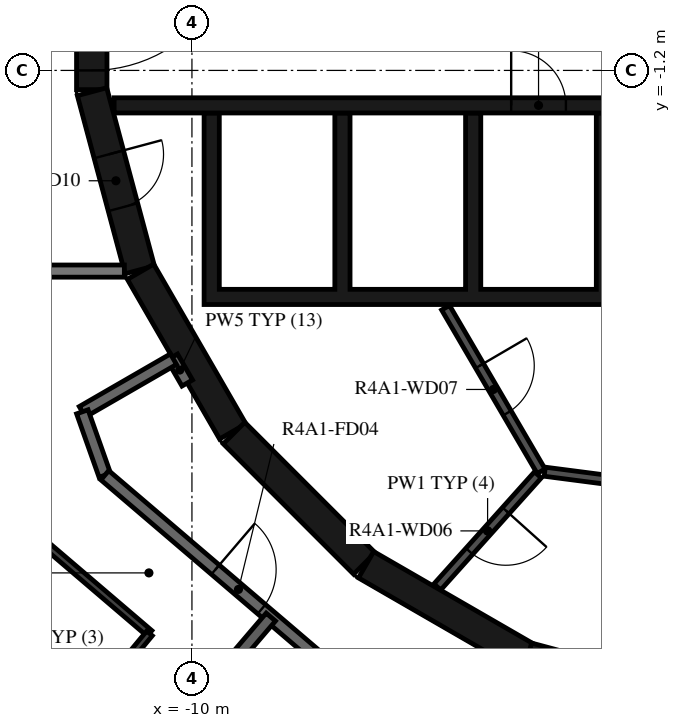
"""IFC4 building model, lengths in metres.
Left out: names, types, materials, properties, quantities, classifications, styles, units other than length and angle.
Written with IfcOpenShell. Run it as: python <this file> out.ifc"""

import sys

from ifc_helpers import new_model, si_unit, direction, frame, frame_2d, origin, place, context, subcontext, project, spatial, polyline, rectangle, outline, extrude, element, fill, save


model = new_model("IFC4")
c1 = context("Model", 3, precision=1e-05, world=origin(), true_north=direction((0.0, 1.0)))
c2 = subcontext(c1, "Body", "Model", "MODEL_VIEW")
j1 = project(units=[si_unit("LENGTHUNIT", "METRE"), si_unit("PLANEANGLEUNIT", "RADIAN")], contexts=[c1])
p1 = place(None, origin())
s1 = spatial("IfcSite", under=j1, at=p1, CompositionType="ELEMENT")
p2 = place(p1, origin())
s2 = spatial("IfcBuilding", under=s1, at=p2, CompositionType="ELEMENT")
p3 = place(p2, frame((0.0, 0.0, 155.2)))
s3 = spatial("IfcBuildingStorey", under=s2, at=p3, CompositionType="ELEMENT", Elevation=155.2)
p4 = place(p3, frame((-11.647, 1.516, 0.0), z_axis=(0.0, 0.0, 1.0), x_axis=(0.0, -1.0, 0.0)))
e1 = element("IfcWall", 1, at=p4, inside=s3, PredefinedType="SHEAR", context=c2, shape_type="SweptSolid", body=[
    extrude(rectangle(XDim=3.033, YDim=0.5, at=frame_2d((1.516, 0.0))), origin(), (0.0, 0.0, 1.0), 3.12),
])
p5 = place(p4, frame((0.316, 0.0, 0.0)))
e2 = element("IfcOpeningElement", 2, at=p5, cuts=e1, PredefinedType="OPENING", context=c2, shape_type="SweptSolid", body=[
    extrude(rectangle(XDim=2.4, YDim=2.1, at=frame_2d((1.2, 1.05))), frame((0.0, 0.26, 0.0), z_axis=(0.0, -1.0, 0.0), x_axis=(1.0, 0.0, 0.0)), (0.0, 0.0, 1.0), 0.52),
])
p6 = place(p3, frame((-11.643, -1.55, 0.0), z_axis=(0.0, 0.0, 1.0), x_axis=(0.258734743916, -0.965948410781, 0.0)))
e3 = element("IfcWall", 3, at=p6, inside=s3, PredefinedType="SHEAR", context=c2, shape_type="SweptSolid", body=[
    extrude(rectangle(XDim=3.033, YDim=0.5, at=frame_2d((1.516, 0.0))), origin(), (0.0, 0.0, 1.0), 3.12),
])
p7 = place(p6, frame((1.066, 0.0, 0.0)))
e4 = element("IfcOpeningElement", 4, at=p7, cuts=e3, PredefinedType="OPENING", context=c2, shape_type="SweptSolid", body=[
    extrude(rectangle(XDim=0.9, YDim=2.1, at=frame_2d((0.45, 1.05))), frame((0.0, 0.26, 0.0), z_axis=(0.0, -1.0, 0.0), x_axis=(1.0, 0.0, 0.0)), (0.0, 0.0, 1.0), 0.52),
])
p8 = place(p3, frame((-10.845, -4.51, 0.0), z_axis=(0.0, 0.0, 1.0), x_axis=(0.500087131594, -0.865975092491, 0.0)))
e5 = element("IfcWall", 5, at=p8, inside=s3, PredefinedType="SHEAR", context=c2, shape_type="SweptSolid", body=[
    extrude(rectangle(XDim=3.033, YDim=0.5, at=frame_2d((1.516, 0.0))), origin(), (0.0, 0.0, 1.0), 3.12),
])
p9 = place(p3, frame((-9.308, -7.164, 0.0), z_axis=(0.0, 0.0, 1.0), x_axis=(0.707106781187, -0.707106781187, 0.0)))
e6 = element("IfcWall", 6, at=p9, inside=s3, PredefinedType="SHEAR", context=c2, shape_type="SweptSolid", body=[
    extrude(rectangle(XDim=3.032, YDim=0.5, at=frame_2d((1.516, 0.0))), origin(), (0.0, 0.0, 1.0), 3.12),
])
for number, where, z_axis, x_axis in (
    (7, (-7.137, -9.329, 0.0), (0.0, 0.0, 1.0), (0.866, -0.5, 0.0)),
    (8, (-4.479, -10.858, 0.0), (0.0, 0.0, 1.0), (0.966, -0.259, 0.0)),
):
    element("IfcWall", number, at=place(p3, frame(where, z_axis=z_axis, x_axis=x_axis)), inside=s3, PredefinedType="SHEAR", context=c2, shape_type="SweptSolid", body=[
        extrude(rectangle(XDim=3.033, YDim=0.5, at=frame_2d((1.516, 0.0))), origin(), (0.0, 0.0, 1.0), 3.12),
    ])
p10 = place(p3, origin())
e9 = element("IfcWall", 9, at=p10, inside=s3, PredefinedType="SHEAR", context=c2, shape_type="SweptSolid", body=[
    extrude(outline(polyline([(9.8, -5.05), (9.8, -4.8), (9.8, -1.9), (9.55, -1.9), (9.55, -4.8), (7.65, -4.8), (7.65, -1.9), (7.4, -1.9), (7.4, -4.8), (5.5, -4.8), (5.5, -1.9), (5.25, -1.9), (5.25, -4.8), (3.35, -4.8), (3.35, -1.9), (3.1, -1.9), (3.1, -4.8), (1.2, -4.8), (1.2, -1.9), (0.95, -1.9), (0.95, -4.8), (-0.95, -4.8), (-0.95, -1.9), (-1.2, -1.9), (-1.2, -4.8), (-3.1, -4.8), (-3.1, -1.9), (-3.35, -1.9), (-3.35, -4.8), (-5.25, -4.8), (-5.25, -1.9), (-5.5, -1.9), (-5.5, -4.8), (-7.4, -4.8), (-7.4, -1.9), (-7.65, -1.9), (-7.65, -4.8), (-9.55, -4.8), (-9.55, -1.9), (-9.8, -1.9), (-9.8, -4.8), (-9.8, -5.05), (9.8, -5.05)])), origin(), (0.0, 0.0, 1.0), 3.12),
])
p11 = place(p3, frame((-11.28, -1.775, 0.0), z_axis=(0.0, 0.0, 1.0), x_axis=(1.0, 0.0, 0.0)))
e10 = element("IfcWall", 10, at=p11, inside=s3, PredefinedType="SHEAR", context=c2, shape_type="SweptSolid", body=[
    extrude(rectangle(XDim=14.38, YDim=0.25, at=frame_2d((7.19, 0.0))), origin(), (0.0, 0.0, 1.0), 3.12),
])
p12 = place(p11, frame((12.88, 0.0, 0.0)))
e11 = element("IfcOpeningElement", 11, at=p12, cuts=e10, PredefinedType="OPENING", context=c2, shape_type="SweptSolid", body=[
    extrude(rectangle(XDim=1.1, YDim=2.1, at=frame_2d((0.55, 1.05))), frame((0.0, 0.135, 0.0), z_axis=(0.0, -1.0, 0.0), x_axis=(1.0, 0.0, 0.0)), (0.0, 0.0, 1.0), 0.27),
])
p13 = place(p11, frame((6.53, 0.0, 0.0)))
e12 = element("IfcOpeningElement", 12, at=p13, cuts=e10, PredefinedType="OPENING", context=c2, shape_type="SweptSolid", body=[
    extrude(rectangle(XDim=0.9, YDim=2.1, at=frame_2d((0.45, 1.05))), frame((0.0, 0.135, 0.0), z_axis=(0.0, -1.0, 0.0), x_axis=(1.0, 0.0, 0.0)), (0.0, 0.0, 1.0), 0.27),
])
p14 = place(p11, frame((8.68, 0.0, 0.0)))
e13 = element("IfcOpeningElement", 13, at=p14, cuts=e10, PredefinedType="OPENING", context=c2, shape_type="SweptSolid", body=[
    extrude(rectangle(XDim=0.9, YDim=2.1, at=frame_2d((0.45, 1.05))), frame((0.0, 0.135, 0.0), z_axis=(0.0, -1.0, 0.0), x_axis=(1.0, 0.0, 0.0)), (0.0, 0.0, 1.0), 0.27),
])
p15 = place(p11, frame((10.83, 0.0, 0.0)))
e14 = element("IfcOpeningElement", 14, at=p15, cuts=e10, PredefinedType="OPENING", context=c2, shape_type="SweptSolid", body=[
    extrude(rectangle(XDim=0.9, YDim=2.1, at=frame_2d((0.45, 1.05))), frame((0.0, 0.135, 0.0), z_axis=(0.0, -1.0, 0.0), x_axis=(1.0, 0.0, 0.0)), (0.0, 0.0, 1.0), 0.27),
])
p16 = place(p3, frame((-5.829, -5.102, 0.0), z_axis=(0.0, 0.0, 1.0), x_axis=(0.504480008384, -0.863423373057, 0.0)))
e15 = element("IfcWall", 15, at=p16, inside=s3, PredefinedType="PARTITIONING", context=c2, shape_type="SweptSolid", body=[
    extrude(rectangle(XDim=3.115, YDim=0.15, at=frame_2d((1.558, 0.0))), origin(), (0.0, 0.0, 1.0), 3.12),
])
p17 = place(p16, frame((1.107, 0.0, 0.0)))
e16 = element("IfcOpeningElement", 16, at=p17, cuts=e15, PredefinedType="OPENING", context=c2, shape_type="SweptSolid", body=[
    extrude(rectangle(XDim=0.9, YDim=2.1, at=frame_2d((0.45, 1.05))), frame((0.0, 0.085, 0.0), z_axis=(0.0, -1.0, 0.0), x_axis=(1.0, 0.0, 0.0)), (0.0, 0.0, 1.0), 0.17),
])
p18 = place(p3, frame((-4.311, -7.851, 0.0), z_axis=(0.0, 0.0, 1.0), x_axis=(-0.667869133096, -0.744278725383, 0.0)))
e17 = element("IfcWall", 17, at=p18, inside=s3, PredefinedType="PARTITIONING", context=c2, shape_type="SweptSolid", body=[
    extrude(rectangle(XDim=2.476, YDim=0.15, at=frame_2d((1.238, 0.0))), origin(), (0.0, 0.0, 1.0), 3.12),
])
p19 = place(p18, frame((0.788, 0.0, 0.0)))
e18 = element("IfcOpeningElement", 18, at=p19, cuts=e17, PredefinedType="OPENING", context=c2, shape_type="SweptSolid", body=[
    extrude(rectangle(XDim=0.9, YDim=2.1, at=frame_2d((0.45, 1.05))), frame((0.0, 0.085, 0.0), z_axis=(0.0, -1.0, 0.0), x_axis=(1.0, 0.0, 0.0)), (0.0, 0.0, 1.0), 0.17),
])
p20 = place(p3, frame((-4.198, -7.799, 0.0), z_axis=(0.0, 0.0, 1.0), x_axis=(0.991686747293, -0.128675542523, 0.0)))
e19 = element("IfcWall", 19, at=p20, inside=s3, PredefinedType="PARTITIONING", context=c2, shape_type="SweptSolid", body=[
    extrude(rectangle(XDim=1.793, YDim=0.15, at=frame_2d((0.896, 0.0))), origin(), (0.0, 0.0, 1.0), 3.12),
])
p21 = place(p3, frame((-10.323, -5.914, 0.0), z_axis=(0.0, 0.0, 1.0), x_axis=(0.500137201729, -0.865946175837, 0.0)))
e20 = element("IfcWall", 20, at=p21, inside=s3, PredefinedType="STANDARD", context=c2, shape_type="SweptSolid", body=[
    extrude(rectangle(XDim=0.492, YDim=0.2, at=frame_2d((0.246, 0.0))), origin(), (0.0, 0.0, 1.0), 3.12),
])
p22 = place(p3, frame((-10.303, -5.949, 0.0), z_axis=(0.0, 0.0, 1.0), x_axis=(-0.866021168401, -0.500007335828, 0.0)))
e21 = element("IfcWall", 21, at=p22, inside=s3, PredefinedType="STANDARD", context=c2, shape_type="SweptSolid", body=[
    extrude(rectangle(XDim=1.731, YDim=0.2, at=frame_2d((0.865, 0.0))), origin(), (0.0, 0.0, 1.0), 3.12),
])
p23 = place(p3, frame((-11.802, -6.814, 0.0), z_axis=(0.0, 0.0, 1.0), x_axis=(0.333904297771, -0.942606980629, 0.0)))
e22 = element("IfcWall", 22, at=p23, inside=s3, PredefinedType="STANDARD", context=c2, shape_type="SweptSolid", body=[
    extrude(rectangle(XDim=1.107, YDim=0.2, at=frame_2d((0.553, 0.0))), origin(), (0.0, 0.0, 1.0), 3.12),
])
p24 = place(p3, frame((-11.433, -7.858, 0.0), z_axis=(0.0, 0.0, 1.0), x_axis=(0.760412154545, -0.649440801937, 0.0)))
e23 = element("IfcWall", 23, at=p24, inside=s3, PredefinedType="STANDARD", context=c2, shape_type="SweptSolid", body=[
    extrude(rectangle(XDim=7.181, YDim=0.2, at=frame_2d((3.59, 0.0))), origin(), (0.0, 0.0, 1.0), 3.12),
])
p25 = place(p24, frame((2.39, 0.0, 0.0)))
e24 = element("IfcOpeningElement", 24, at=p25, cuts=e23, PredefinedType="OPENING", context=c2, shape_type="SweptSolid", body=[
    extrude(rectangle(XDim=1.0, YDim=2.1, at=frame_2d((0.5, 1.05))), frame((0.0, 0.11, 0.0), z_axis=(0.0, -1.0, 0.0), x_axis=(1.0, 0.0, 0.0)), (0.0, 0.0, 1.0), 0.22),
])
p26 = place(p3, frame((-17.9, -4.5, 0.0), z_axis=(0.0, 0.0, 1.0), x_axis=(1.0, 0.0, 0.0)))
e25 = element("IfcWall", 25, at=p26, inside=s3, PredefinedType="STANDARD", context=c2, shape_type="SweptSolid", body=[
    extrude(rectangle(XDim=6.789, YDim=0.2, at=frame_2d((3.394, 0.0))), origin(), (0.0, 0.0, 1.0), 3.12),
])
p27 = place(p3, frame((-11.838, -13.86, 0.0), z_axis=(0.0, 0.0, 1.0), x_axis=(0.64944503311, 0.760408540831, 0.0)))
e26 = element("IfcWall", 26, at=p27, inside=s3, PredefinedType="STANDARD", context=c2, shape_type="SweptSolid", body=[
    extrude(rectangle(XDim=4.827, YDim=0.2, at=frame_2d((2.414, 0.0))), origin(), (0.0, 0.0, 1.0), 3.12),
])
p28 = place(p3, frame((-12.713, -8.737, 0.0), z_axis=(0.0, 0.0, 1.0), x_axis=(0.760400223405, -0.649454771517, 0.0)))
e27 = element("IfcWall", 27, at=p28, inside=s3, PredefinedType="PARTITIONING", context=c2, shape_type="SweptSolid", body=[
    extrude(rectangle(XDim=2.649, YDim=0.12, at=frame_2d((1.325, 0.0))), origin(), (0.0, 0.0, 1.0), 3.12),
])
p29 = place(p3, frame((-10.698, -10.458, 0.0), z_axis=(0.0, 0.0, 1.0), x_axis=(-0.63830561059, -0.769783052223, 0.0)))
e28 = element("IfcWall", 28, at=p29, inside=s3, PredefinedType="PARTITIONING", context=c2, shape_type="SweptSolid", body=[
    extrude(rectangle(XDim=5.131, YDim=0.12, at=frame_2d((2.565, 0.0))), origin(), (0.0, 0.0, 1.0), 3.12),
])
p30 = place(p29, frame((2.363, 0.0, 0.0)))
e29 = element("IfcOpeningElement", 29, at=p30, cuts=e28, PredefinedType="OPENING", context=c2, shape_type="SweptSolid", body=[
    extrude(rectangle(XDim=0.8, YDim=2.1, at=frame_2d((0.4, 1.05))), frame((0.0, 0.07, 0.0), z_axis=(0.0, -1.0, 0.0), x_axis=(1.0, 0.0, 0.0)), (0.0, 0.0, 1.0), 0.14),
])
p31 = place(p5, origin())
e30 = element("IfcDoor", 30, at=p31, inside=s3, OperationType="DOUBLE_DOOR_SINGLE_SWING", PredefinedType="DOOR", context=c2, shape_type="SweptSolid", body=[
    extrude(rectangle(XDim=2.4, YDim=2.1, at=frame_2d((1.2, 1.05))), frame((0.0, 0.025, 0.0), z_axis=(0.0, -1.0, 0.0), x_axis=(1.0, 0.0, 0.0)), (0.0, 0.0, 1.0), 0.05),
])
fill(e2, e30)
p32 = place(p13, origin())
e31 = element("IfcDoor", 31, at=p32, inside=s3, OperationType="SINGLE_SWING_LEFT", PredefinedType="DOOR", context=c2, shape_type="SweptSolid", body=[
    extrude(rectangle(XDim=0.9, YDim=2.1, at=frame_2d((0.45, 1.05))), frame((0.0, 0.025, 0.0), z_axis=(0.0, -1.0, 0.0), x_axis=(1.0, 0.0, 0.0)), (0.0, 0.0, 1.0), 0.05),
])
fill(e12, e31)
p33 = place(p19, origin())
e32 = element("IfcDoor", 32, at=p33, inside=s3, OperationType="SINGLE_SWING_RIGHT", PredefinedType="DOOR", context=c2, shape_type="SweptSolid", body=[
    extrude(rectangle(XDim=0.9, YDim=2.1, at=frame_2d((0.45, 1.05))), frame((0.0, 0.025, 0.0), z_axis=(0.0, -1.0, 0.0), x_axis=(1.0, 0.0, 0.0)), (0.0, 0.0, 1.0), 0.05),
])
fill(e18, e32)
p34 = place(p17, origin())
e33 = element("IfcDoor", 33, at=p34, inside=s3, OperationType="SINGLE_SWING_LEFT", PredefinedType="DOOR", context=c2, shape_type="SweptSolid", body=[
    extrude(rectangle(XDim=0.9, YDim=2.1, at=frame_2d((0.45, 1.05))), frame((0.0, 0.025, 0.0), z_axis=(0.0, -1.0, 0.0), x_axis=(1.0, 0.0, 0.0)), (0.0, 0.0, 1.0), 0.05),
])
fill(e16, e33)
p35 = place(p7, origin())
e34 = element("IfcDoor", 34, at=p35, inside=s3, OperationType="SINGLE_SWING_RIGHT", PredefinedType="DOOR", context=c2, shape_type="SweptSolid", body=[
    extrude(rectangle(XDim=0.9, YDim=2.1, at=frame_2d((0.45, 1.05))), frame((0.0, 0.025, 0.0), z_axis=(0.0, -1.0, 0.0), x_axis=(1.0, 0.0, 0.0)), (0.0, 0.0, 1.0), 0.05),
])
fill(e4, e34)
p36 = place(p25, origin())
e35 = element("IfcDoor", 35, at=p36, inside=s3, OperationType="SINGLE_SWING_RIGHT", PredefinedType="DOOR", context=c2, shape_type="SweptSolid", body=[
    extrude(rectangle(XDim=1.0, YDim=2.1, at=frame_2d((0.5, 1.05))), frame((0.0, 0.025, 0.0), z_axis=(0.0, -1.0, 0.0), x_axis=(1.0, 0.0, 0.0)), (0.0, 0.0, 1.0), 0.05),
])
fill(e24, e35)
save(model, sys.argv[1])
